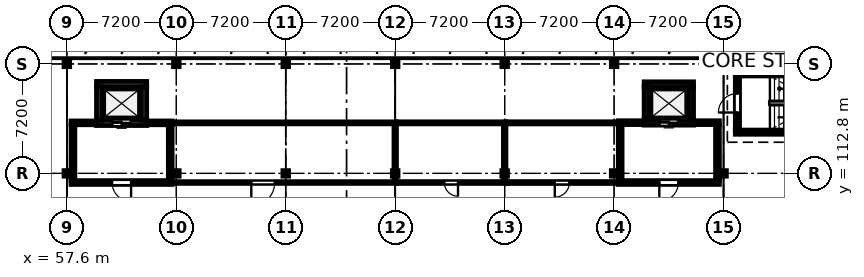
"""IFC4 building model, lengths in metres.
Left out: names, types, materials, properties, quantities, classifications, styles, units other than length and angle.
Written with IfcOpenShell. Run it as: python <this file> out.ifc"""

import sys

from ifc_helpers import new_model, si_unit, direction, frame, frame_2d, origin, origin_2d, place, context, subcontext, project, spatial, rectangle, i_section, extrude, element, fill, save


model = new_model("IFC4")
c1 = context("Model", 3, precision=1e-05, world=origin(), true_north=direction((0.0, 1.0)))
c2 = subcontext(c1, "Body", "Model", "MODEL_VIEW")
j1 = project(units=[si_unit("LENGTHUNIT", "METRE"), si_unit("PLANEANGLEUNIT", "RADIAN")], contexts=[c1])
p1 = place(None, origin())
s1 = spatial("IfcSite", under=j1, at=p1, CompositionType="ELEMENT")
p2 = place(p1, origin())
s2 = spatial("IfcBuilding", under=s1, at=p2, CompositionType="ELEMENT")
p3 = place(p2, frame((0.0, 0.0, 17.1)))
s3 = spatial("IfcBuildingStorey", under=s2, at=p3, CompositionType="ELEMENT", Elevation=17.1)
p4 = place(p3, frame((57.6, 112.8, 0.0), z_axis=(0.0, 0.0, 1.0), x_axis=(1.0, 0.0, 0.0)))
e1 = element("IfcColumn", 1, at=p4, inside=s3, PredefinedType="COLUMN", context=c2, shape_type="SweptSolid", body=[
    extrude(i_section(OverallWidth=0.371, OverallDepth=0.363, WebThickness=0.013, FlangeThickness=0.022, FilletRadius=0.015, at=origin_2d()), origin(), (0.0, 0.0, 1.0), 3.9),
])
p5 = place(p3, frame((57.6, 120.0, 0.0), z_axis=(0.0, 0.0, 1.0), x_axis=(1.0, 0.0, 0.0)))
e2 = element("IfcColumn", 2, at=p5, inside=s3, PredefinedType="COLUMN", context=c2, shape_type="SweptSolid", body=[
    extrude(i_section(OverallWidth=0.368, OverallDepth=0.356, WebThickness=0.011, FlangeThickness=0.018, FilletRadius=0.015, at=origin_2d()), origin(), (0.0, 0.0, 1.0), 3.9),
])
p6 = place(p3, frame((64.8, 112.8, 0.0), z_axis=(0.0, 0.0, 1.0), x_axis=(1.0, 0.0, 0.0)))
e3 = element("IfcColumn", 3, at=p6, inside=s3, PredefinedType="COLUMN", context=c2, shape_type="SweptSolid", body=[
    extrude(i_section(OverallWidth=0.371, OverallDepth=0.363, WebThickness=0.013, FlangeThickness=0.022, FilletRadius=0.015, at=origin_2d()), origin(), (0.0, 0.0, 1.0), 3.9),
])
p7 = place(p3, frame((64.8, 120.0, 0.0), z_axis=(0.0, 0.0, 1.0), x_axis=(1.0, 0.0, 0.0)))
e4 = element("IfcColumn", 4, at=p7, inside=s3, PredefinedType="COLUMN", context=c2, shape_type="SweptSolid", body=[
    extrude(i_section(OverallWidth=0.368, OverallDepth=0.356, WebThickness=0.011, FlangeThickness=0.018, FilletRadius=0.015, at=origin_2d()), origin(), (0.0, 0.0, 1.0), 3.9),
])
p8 = place(p3, frame((72.0, 112.8, 0.0), z_axis=(0.0, 0.0, 1.0), x_axis=(1.0, 0.0, 0.0)))
e5 = element("IfcColumn", 5, at=p8, inside=s3, PredefinedType="COLUMN", context=c2, shape_type="SweptSolid", body=[
    extrude(i_section(OverallWidth=0.371, OverallDepth=0.363, WebThickness=0.013, FlangeThickness=0.022, FilletRadius=0.015, at=origin_2d()), origin(), (0.0, 0.0, 1.0), 3.9),
])
p9 = place(p3, frame((72.0, 120.0, 0.0), z_axis=(0.0, 0.0, 1.0), x_axis=(1.0, 0.0, 0.0)))
e6 = element("IfcColumn", 6, at=p9, inside=s3, PredefinedType="COLUMN", context=c2, shape_type="SweptSolid", body=[
    extrude(i_section(OverallWidth=0.368, OverallDepth=0.356, WebThickness=0.011, FlangeThickness=0.018, FilletRadius=0.015, at=origin_2d()), origin(), (0.0, 0.0, 1.0), 3.9),
])
p10 = place(p3, frame((79.2, 112.8, 0.0), z_axis=(0.0, 0.0, 1.0), x_axis=(1.0, 0.0, 0.0)))
e7 = element("IfcColumn", 7, at=p10, inside=s3, PredefinedType="COLUMN", context=c2, shape_type="SweptSolid", body=[
    extrude(i_section(OverallWidth=0.371, OverallDepth=0.363, WebThickness=0.013, FlangeThickness=0.022, FilletRadius=0.015, at=origin_2d()), origin(), (0.0, 0.0, 1.0), 3.9),
])
p11 = place(p3, frame((79.2, 120.0, 0.0), z_axis=(0.0, 0.0, 1.0), x_axis=(1.0, 0.0, 0.0)))
e8 = element("IfcColumn", 8, at=p11, inside=s3, PredefinedType="COLUMN", context=c2, shape_type="SweptSolid", body=[
    extrude(i_section(OverallWidth=0.368, OverallDepth=0.356, WebThickness=0.011, FlangeThickness=0.018, FilletRadius=0.015, at=origin_2d()), origin(), (0.0, 0.0, 1.0), 3.9),
])
p12 = place(p3, frame((86.4, 112.8, 0.0), z_axis=(0.0, 0.0, 1.0), x_axis=(1.0, 0.0, 0.0)))
e9 = element("IfcColumn", 9, at=p12, inside=s3, PredefinedType="COLUMN", context=c2, shape_type="SweptSolid", body=[
    extrude(i_section(OverallWidth=0.371, OverallDepth=0.363, WebThickness=0.013, FlangeThickness=0.022, FilletRadius=0.015, at=origin_2d()), origin(), (0.0, 0.0, 1.0), 3.9),
])
p13 = place(p3, frame((86.4, 120.0, 0.0), z_axis=(0.0, 0.0, 1.0), x_axis=(1.0, 0.0, 0.0)))
e10 = element("IfcColumn", 10, at=p13, inside=s3, PredefinedType="COLUMN", context=c2, shape_type="SweptSolid", body=[
    extrude(i_section(OverallWidth=0.368, OverallDepth=0.356, WebThickness=0.011, FlangeThickness=0.018, FilletRadius=0.015, at=origin_2d()), origin(), (0.0, 0.0, 1.0), 3.9),
])
p14 = place(p3, frame((93.6, 112.8, 0.0), z_axis=(0.0, 0.0, 1.0), x_axis=(1.0, 0.0, 0.0)))
e11 = element("IfcColumn", 11, at=p14, inside=s3, PredefinedType="COLUMN", context=c2, shape_type="SweptSolid", body=[
    extrude(i_section(OverallWidth=0.371, OverallDepth=0.363, WebThickness=0.013, FlangeThickness=0.022, FilletRadius=0.015, at=origin_2d()), origin(), (0.0, 0.0, 1.0), 3.9),
])
p15 = place(p3, frame((93.6, 120.0, 0.0), z_axis=(0.0, 0.0, 1.0), x_axis=(1.0, 0.0, 0.0)))
e12 = element("IfcColumn", 12, at=p15, inside=s3, PredefinedType="COLUMN", context=c2, shape_type="SweptSolid", body=[
    extrude(i_section(OverallWidth=0.368, OverallDepth=0.356, WebThickness=0.011, FlangeThickness=0.018, FilletRadius=0.015, at=origin_2d()), origin(), (0.0, 0.0, 1.0), 3.9),
])
p16 = place(p3, frame((100.8, 112.8, 0.0), z_axis=(0.0, 0.0, 1.0), x_axis=(1.0, 0.0, 0.0)))
e13 = element("IfcColumn", 13, at=p16, inside=s3, PredefinedType="COLUMN", context=c2, shape_type="SweptSolid", body=[
    extrude(i_section(OverallWidth=0.371, OverallDepth=0.363, WebThickness=0.013, FlangeThickness=0.022, FilletRadius=0.015, at=origin_2d()), origin(), (0.0, 0.0, 1.0), 3.9),
])
p17 = place(p3, frame((100.8, 120.0, 0.0), z_axis=(0.0, 0.0, 1.0), x_axis=(1.0, 0.0, 0.0)))
e14 = element("IfcColumn", 14, at=p17, inside=s3, PredefinedType="COLUMN", context=c2, shape_type="SweptSolid", body=[
    extrude(i_section(OverallWidth=0.368, OverallDepth=0.356, WebThickness=0.011, FlangeThickness=0.018, FilletRadius=0.015, at=origin_2d()), origin(), (0.0, 0.0, 1.0), 3.9),
])
for number, where, z_axis, x_axis in (
    (15, (110.475, 115.512, 0.0), (0.0, 0.0, 1.0), (-1.0, 0.0, 0.0)),
    (16, (101.575, 119.348, 0.0), (0.0, 0.0, 1.0), (1.0, 0.0, 0.0)),
):
    element("IfcWall", number, at=place(p3, frame(where, z_axis=z_axis, x_axis=x_axis)), inside=s3, PredefinedType="SOLIDWALL", context=c2, shape_type="SweptSolid", body=[
        extrude(rectangle(XDim=8.9, YDim=0.275, at=frame_2d((4.45, 0.0))), origin(), (0.0, 0.0, 1.0), 3.64),
    ])
p18 = place(p3, frame((101.712, 115.65, 0.0), z_axis=(0.0, 0.0, 1.0), x_axis=(0.0, 1.0, 0.0)))
e17 = element("IfcWall", 17, at=p18, inside=s3, PredefinedType="SOLIDWALL", context=c2, shape_type="SweptSolid", body=[
    extrude(rectangle(XDim=3.56, YDim=0.275, at=frame_2d((1.78, 0.0))), origin(), (0.0, 0.0, 1.0), 3.64),
])
p19 = place(p18, frame((1.155, 0.0, 0.0)))
e18 = element("IfcOpeningElement", 18, at=p19, cuts=e17, PredefinedType="OPENING", context=c2, shape_type="SweptSolid", body=[
    extrude(rectangle(XDim=1.25, YDim=2.2, at=frame_2d((0.625, 1.1))), frame((0.0, 0.147, 0.0), z_axis=(0.0, -1.0, 0.0), x_axis=(1.0, 0.0, 0.0)), (0.0, 0.0, 1.0), 0.295),
])
p20 = place(p3, frame((62.85, 116.125, 0.0), z_axis=(0.0, 0.0, 1.0), x_axis=(-1.0, 0.0, 0.0)))
e19 = element("IfcWall", 19, at=p20, inside=s3, PredefinedType="SHEAR", context=c2, shape_type="SweptSolid", body=[
    extrude(rectangle(XDim=3.3, YDim=0.35, at=frame_2d((1.65, 0.0))), origin(), (0.0, 0.0, 1.0), 3.64),
])
p21 = place(p20, frame((1.05, 0.0, 0.0)))
e20 = element("IfcOpeningElement", 20, at=p21, cuts=e19, PredefinedType="OPENING", context=c2, shape_type="SweptSolid", body=[
    extrude(rectangle(XDim=1.2, YDim=2.2, at=frame_2d((0.6, 1.1))), frame((0.0, 0.185, 0.0), z_axis=(0.0, -1.0, 0.0), x_axis=(1.0, 0.0, 0.0)), (0.0, 0.0, 1.0), 0.37),
])
p22 = place(p3, frame((59.55, 118.675, 0.0), z_axis=(0.0, 0.0, 1.0), x_axis=(1.0, 0.0, 0.0)))
e21 = element("IfcWall", 21, at=p22, inside=s3, PredefinedType="SHEAR", context=c2, shape_type="SweptSolid", body=[
    extrude(rectangle(XDim=3.3, YDim=0.35, at=frame_2d((1.65, 0.0))), origin(), (0.0, 0.0, 1.0), 3.64),
])
for number, where, z_axis, x_axis in (
    (22, (59.725, 116.3, 0.0), (0.0, 0.0, 1.0), (0.0, 1.0, 0.0)),
    (23, (62.675, 118.5, 0.0), (0.0, 0.0, 1.0), (0.0, -1.0, 0.0)),
):
    element("IfcWall", number, at=place(p3, frame(where, z_axis=z_axis, x_axis=x_axis)), inside=s3, PredefinedType="SHEAR", context=c2, shape_type="SweptSolid", body=[
        extrude(rectangle(XDim=2.2, YDim=0.35, at=frame_2d((1.1, 0.0))), origin(), (0.0, 0.0, 1.0), 3.64),
    ])
p23 = place(p3, frame((98.825, 116.138, 0.0), z_axis=(0.0, 0.0, 1.0), x_axis=(-1.0, 0.0, 0.0)))
e24 = element("IfcWall", 24, at=p23, inside=s3, PredefinedType="SHEAR", context=c2, shape_type="SweptSolid", body=[
    extrude(rectangle(XDim=3.25, YDim=0.325, at=frame_2d((1.625, 0.0))), origin(), (0.0, 0.0, 1.0), 3.64),
])
p24 = place(p23, frame((1.025, 0.0, 0.0)))
e25 = element("IfcOpeningElement", 25, at=p24, cuts=e24, PredefinedType="OPENING", context=c2, shape_type="SweptSolid", body=[
    extrude(rectangle(XDim=1.2, YDim=2.2, at=frame_2d((0.6, 1.1))), frame((0.0, 0.172, 0.0), z_axis=(0.0, -1.0, 0.0), x_axis=(1.0, 0.0, 0.0)), (0.0, 0.0, 1.0), 0.345),
])
p25 = place(p3, frame((95.575, 118.662, 0.0), z_axis=(0.0, 0.0, 1.0), x_axis=(1.0, 0.0, 0.0)))
e26 = element("IfcWall", 26, at=p25, inside=s3, PredefinedType="SHEAR", context=c2, shape_type="SweptSolid", body=[
    extrude(rectangle(XDim=3.25, YDim=0.325, at=frame_2d((1.625, 0.0))), origin(), (0.0, 0.0, 1.0), 3.64),
])
for number, where, z_axis, x_axis in (
    (27, (95.738, 116.3, 0.0), (0.0, 0.0, 1.0), (0.0, 1.0, 0.0)),
    (28, (98.662, 118.5, 0.0), (0.0, 0.0, 1.0), (0.0, -1.0, 0.0)),
):
    element("IfcWall", number, at=place(p3, frame(where, z_axis=z_axis, x_axis=x_axis)), inside=s3, PredefinedType="SHEAR", context=c2, shape_type="SweptSolid", body=[
        extrude(rectangle(XDim=2.2, YDim=0.325, at=frame_2d((1.1, 0.0))), origin(), (0.0, 0.0, 1.0), 3.64),
    ])
p26 = place(p3, frame((64.525, 112.2, 0.0), z_axis=(0.0, 0.0, 1.0), x_axis=(-1.0, 0.0, 0.0)))
e29 = element("IfcWall", 29, at=p26, inside=s3, PredefinedType="PARTITIONING", context=c2, shape_type="SweptSolid", body=[
    extrude(rectangle(XDim=6.65, YDim=0.25, at=frame_2d((3.325, 0.0))), origin(), (0.0, 0.0, 1.0), 2.863),
])
p27 = place(p26, frame((2.7, 0.0, 0.0)))
e30 = element("IfcOpeningElement", 30, at=p27, cuts=e29, PredefinedType="OPENING", context=c2, shape_type="SweptSolid", body=[
    extrude(rectangle(XDim=1.25, YDim=2.2, at=frame_2d((0.625, 1.1))), frame((0.0, 0.135, 0.0), z_axis=(0.0, -1.0, 0.0), x_axis=(1.0, 0.0, 0.0)), (0.0, 0.0, 1.0), 0.27),
])
p28 = place(p3, frame((57.875, 116.125, 0.0), z_axis=(0.0, 0.0, 1.0), x_axis=(1.0, 0.0, 0.0)))
e31 = element("IfcWall", 31, at=p28, inside=s3, PredefinedType="PARTITIONING", context=c2, shape_type="SweptSolid", body=[
    extrude(rectangle(XDim=1.673, YDim=0.25, at=frame_2d((0.836, 0.0))), origin(), (0.0, 0.0, 1.0), 2.863),
])
p29 = place(p3, frame((62.852, 116.125, 0.0), z_axis=(0.0, 0.0, 1.0), x_axis=(1.0, 0.0, 0.0)))
e32 = element("IfcWall", 32, at=p29, inside=s3, PredefinedType="PARTITIONING", context=c2, shape_type="SweptSolid", body=[
    extrude(rectangle(XDim=1.673, YDim=0.25, at=frame_2d((0.836, 0.0))), origin(), (0.0, 0.0, 1.0), 2.863),
])
for number, where, z_axis, x_axis in (
    (33, (58.0, 112.327, 0.0), (0.0, 0.0, 1.0), (0.0, 1.0, 0.0)),
    (34, (64.4, 115.998, 0.0), (0.0, 0.0, 1.0), (0.0, -1.0, 0.0)),
):
    element("IfcWall", number, at=place(p3, frame(where, z_axis=z_axis, x_axis=x_axis)), inside=s3, PredefinedType="PARTITIONING", context=c2, shape_type="SweptSolid", body=[
        extrude(rectangle(XDim=3.671, YDim=0.25, at=frame_2d((1.835, 0.0))), origin(), (0.0, 0.0, 1.0), 2.863),
    ])
p30 = place(p3, frame((100.525, 112.2, 0.0), z_axis=(0.0, 0.0, 1.0), x_axis=(-1.0, 0.0, 0.0)))
e35 = element("IfcWall", 35, at=p30, inside=s3, PredefinedType="PARTITIONING", context=c2, shape_type="SweptSolid", body=[
    extrude(rectangle(XDim=6.65, YDim=0.25, at=frame_2d((3.325, 0.0))), origin(), (0.0, 0.0, 1.0), 2.863),
])
p31 = place(p30, frame((2.7, 0.0, 0.0)))
e36 = element("IfcOpeningElement", 36, at=p31, cuts=e35, PredefinedType="OPENING", context=c2, shape_type="SweptSolid", body=[
    extrude(rectangle(XDim=1.25, YDim=2.2, at=frame_2d((0.625, 1.1))), frame((0.0, 0.135, 0.0), z_axis=(0.0, -1.0, 0.0), x_axis=(1.0, 0.0, 0.0)), (0.0, 0.0, 1.0), 0.27),
])
for number, where, z_axis, x_axis in (
    (37, (93.875, 116.138, 0.0), (0.0, 0.0, 1.0), (1.0, 0.0, 0.0)),
    (38, (98.827, 116.138, 0.0), (0.0, 0.0, 1.0), (1.0, 0.0, 0.0)),
):
    element("IfcWall", number, at=place(p3, frame(where, z_axis=z_axis, x_axis=x_axis)), inside=s3, PredefinedType="PARTITIONING", context=c2, shape_type="SweptSolid", body=[
        extrude(rectangle(XDim=1.698, YDim=0.25, at=frame_2d((0.849, 0.0))), origin(), (0.0, 0.0, 1.0), 2.863),
    ])
for number, where, z_axis, x_axis in (
    (39, (94.0, 112.327, 0.0), (0.0, 0.0, 1.0), (0.0, 1.0, 0.0)),
    (40, (100.4, 116.011, 0.0), (0.0, 0.0, 1.0), (0.0, -1.0, 0.0)),
):
    element("IfcWall", number, at=place(p3, frame(where, z_axis=z_axis, x_axis=x_axis)), inside=s3, PredefinedType="PARTITIONING", context=c2, shape_type="SweptSolid", body=[
        extrude(rectangle(XDim=3.684, YDim=0.25, at=frame_2d((1.842, 0.0))), origin(), (0.0, 0.0, 1.0), 2.863),
    ])
p32 = place(p3, frame((79.28, 112.2, 0.0), z_axis=(0.0, 0.0, 1.0), x_axis=(-1.0, 0.0, 0.0)))
e41 = element("IfcWall", 41, at=p32, inside=s3, PredefinedType="PARTITIONING", context=c2, shape_type="SweptSolid", body=[
    extrude(rectangle(XDim=14.753, YDim=0.115, at=frame_2d((7.376, 0.0))), origin(), (0.0, 0.0, 1.0), 2.863),
])
p33 = place(p32, frame((8.007, 0.0, 0.0)))
e42 = element("IfcOpeningElement", 42, at=p33, cuts=e41, PredefinedType="OPENING", context=c2, shape_type="SweptSolid", body=[
    extrude(rectangle(XDim=1.54, YDim=2.1, at=frame_2d((0.77, 1.05))), frame((0.0, 0.067, 0.0), z_axis=(0.0, -1.0, 0.0), x_axis=(1.0, 0.0, 0.0)), (0.0, 0.0, 1.0), 0.135),
])
p34 = place(p3, frame((86.48, 112.2, 0.0), z_axis=(0.0, 0.0, 1.0), x_axis=(-1.0, 0.0, 0.0)))
e43 = element("IfcWall", 43, at=p34, inside=s3, PredefinedType="PARTITIONING", context=c2, shape_type="SweptSolid", body=[
    extrude(rectangle(XDim=7.198, YDim=0.12, at=frame_2d((3.599, 0.0))), origin(), (0.0, 0.0, 1.0), 2.863),
])
p35 = place(p34, frame((3.149, 0.0, 0.0)))
e44 = element("IfcOpeningElement", 44, at=p35, cuts=e43, PredefinedType="OPENING", context=c2, shape_type="SweptSolid", body=[
    extrude(rectangle(XDim=0.9, YDim=2.16, at=frame_2d((0.45, 1.08))), frame((0.0, 0.07, 0.0), z_axis=(0.0, -1.0, 0.0), x_axis=(1.0, 0.0, 0.0)), (0.0, 0.0, 1.0), 0.14),
])
p36 = place(p3, frame((93.873, 112.2, 0.0), z_axis=(0.0, 0.0, 1.0), x_axis=(-1.0, 0.0, 0.0)))
e45 = element("IfcWall", 45, at=p36, inside=s3, PredefinedType="PARTITIONING", context=c2, shape_type="SweptSolid", body=[
    extrude(rectangle(XDim=7.391, YDim=0.125, at=frame_2d((3.696, 0.0))), origin(), (0.0, 0.0, 1.0), 2.863),
])
p37 = place(p36, frame((3.216, 0.0, 0.0)))
e46 = element("IfcOpeningElement", 46, at=p37, cuts=e45, PredefinedType="OPENING", context=c2, shape_type="SweptSolid", body=[
    extrude(rectangle(XDim=0.96, YDim=2.16, at=frame_2d((0.48, 1.08))), frame((0.0, 0.073, 0.0), z_axis=(0.0, -1.0, 0.0), x_axis=(1.0, 0.0, 0.0)), (0.0, 0.0, 1.0), 0.145),
])
p38 = place(p3, frame((64.527, 116.125, 0.0), z_axis=(0.0, 0.0, 1.0), x_axis=(1.0, 0.0, 0.0)))
e47 = element("IfcWall", 47, at=p38, inside=s3, PredefinedType="PARTITIONING", context=c2, shape_type="SweptSolid", body=[
    extrude(rectangle(XDim=14.753, YDim=0.13, at=frame_2d((7.376, 0.0))), origin(), (0.0, 0.0, 1.0), 2.863),
])
p39 = place(p3, frame((79.282, 116.125, 0.0), z_axis=(0.0, 0.0, 1.0), x_axis=(1.0, 0.0, 0.0)))
e48 = element("IfcWall", 48, at=p39, inside=s3, PredefinedType="PARTITIONING", context=c2, shape_type="SweptSolid", body=[
    extrude(rectangle(XDim=7.198, YDim=0.135, at=frame_2d((3.599, 0.0))), origin(), (0.0, 0.0, 1.0), 2.863),
])
p40 = place(p3, frame((86.482, 116.125, 0.0), z_axis=(0.0, 0.0, 1.0), x_axis=(1.0, 0.0, 0.0)))
e49 = element("IfcWall", 49, at=p40, inside=s3, PredefinedType="PARTITIONING", context=c2, shape_type="SweptSolid", body=[
    extrude(rectangle(XDim=7.391, YDim=0.14, at=frame_2d((3.696, 0.0))), origin(), (0.0, 0.0, 1.0), 2.863),
])
p41 = place(p3, frame((79.2, 116.056, 0.0), z_axis=(0.0, 0.0, 1.0), x_axis=(0.0, -1.0, 0.0)))
e50 = element("IfcWall", 50, at=p41, inside=s3, PredefinedType="PARTITIONING", context=c2, shape_type="SweptSolid", body=[
    extrude(rectangle(XDim=3.794, YDim=0.16, at=frame_2d((1.897, 0.0))), origin(), (0.0, 0.0, 1.0), 2.863),
])
p42 = place(p3, frame((86.4, 116.053, 0.0), z_axis=(0.0, 0.0, 1.0), x_axis=(0.0, -1.0, 0.0)))
e51 = element("IfcWall", 51, at=p42, inside=s3, PredefinedType="PARTITIONING", context=c2, shape_type="SweptSolid", body=[
    extrude(rectangle(XDim=3.789, YDim=0.165, at=frame_2d((1.895, 0.0))), origin(), (0.0, 0.0, 1.0), 2.863),
])
p43 = place(p19, origin())
e52 = element("IfcDoor", 52, at=p43, inside=s3, OperationType="SINGLE_SWING_LEFT", PredefinedType="DOOR", context=c2, shape_type="SweptSolid", body=[
    extrude(rectangle(XDim=1.25, YDim=2.2, at=frame_2d((0.625, 1.1))), frame((0.0, 0.025, 0.0), z_axis=(0.0, -1.0, 0.0), x_axis=(1.0, 0.0, 0.0)), (0.0, 0.0, 1.0), 0.05),
])
fill(e18, e52)
p44 = place(p21, origin())
e53 = element("IfcDoor", 53, at=p44, inside=s3, OperationType="DOUBLE_DOOR_SLIDING", PredefinedType="DOOR", context=c2, shape_type="SweptSolid", body=[
    extrude(rectangle(XDim=1.2, YDim=2.2, at=frame_2d((0.6, 1.1))), frame((0.0, 0.025, 0.0), z_axis=(0.0, -1.0, 0.0), x_axis=(1.0, 0.0, 0.0)), (0.0, 0.0, 1.0), 0.05),
])
fill(e20, e53)
p45 = place(p24, origin())
e54 = element("IfcDoor", 54, at=p45, inside=s3, OperationType="DOUBLE_DOOR_SLIDING", PredefinedType="DOOR", context=c2, shape_type="SweptSolid", body=[
    extrude(rectangle(XDim=1.2, YDim=2.2, at=frame_2d((0.6, 1.1))), frame((0.0, 0.025, 0.0), z_axis=(0.0, -1.0, 0.0), x_axis=(1.0, 0.0, 0.0)), (0.0, 0.0, 1.0), 0.05),
])
fill(e25, e54)
p46 = place(p27, origin())
e55 = element("IfcDoor", 55, at=p46, inside=s3, OperationType="SINGLE_SWING_LEFT", PredefinedType="DOOR", context=c2, shape_type="SweptSolid", body=[
    extrude(rectangle(XDim=1.25, YDim=2.2, at=frame_2d((0.625, 1.1))), frame((0.0, 0.025, 0.0), z_axis=(0.0, -1.0, 0.0), x_axis=(1.0, 0.0, 0.0)), (0.0, 0.0, 1.0), 0.05),
])
fill(e30, e55)
p47 = place(p31, origin())
e56 = element("IfcDoor", 56, at=p47, inside=s3, OperationType="SINGLE_SWING_RIGHT", PredefinedType="DOOR", context=c2, shape_type="SweptSolid", body=[
    extrude(rectangle(XDim=1.25, YDim=2.2, at=frame_2d((0.625, 1.1))), frame((0.0, 0.025, 0.0), z_axis=(0.0, -1.0, 0.0), x_axis=(1.0, 0.0, 0.0)), (0.0, 0.0, 1.0), 0.05),
])
fill(e36, e56)
p48 = place(p33, origin())
e57 = element("IfcDoor", 57, at=p48, inside=s3, OperationType="SINGLE_SWING_RIGHT", PredefinedType="DOOR", context=c2, shape_type="SweptSolid", body=[
    extrude(rectangle(XDim=1.54, YDim=2.1, at=frame_2d((0.77, 1.05))), frame((0.0, 0.025, 0.0), z_axis=(0.0, -1.0, 0.0), x_axis=(1.0, 0.0, 0.0)), (0.0, 0.0, 1.0), 0.05),
])
fill(e42, e57)
p49 = place(p35, origin())
e58 = element("IfcDoor", 58, at=p49, inside=s3, OperationType="SINGLE_SWING_LEFT", PredefinedType="DOOR", context=c2, shape_type="SweptSolid", body=[
    extrude(rectangle(XDim=0.9, YDim=2.16, at=frame_2d((0.45, 1.08))), frame((0.0, 0.025, 0.0), z_axis=(0.0, -1.0, 0.0), x_axis=(1.0, 0.0, 0.0)), (0.0, 0.0, 1.0), 0.05),
])
fill(e44, e58)
p50 = place(p37, origin())
e59 = element("IfcDoor", 59, at=p50, inside=s3, OperationType="SINGLE_SWING_RIGHT", PredefinedType="DOOR", context=c2, shape_type="SweptSolid", body=[
    extrude(rectangle(XDim=0.96, YDim=2.16, at=frame_2d((0.48, 1.08))), frame((0.0, 0.025, 0.0), z_axis=(0.0, -1.0, 0.0), x_axis=(1.0, 0.0, 0.0)), (0.0, 0.0, 1.0), 0.05),
])
fill(e46, e59)
save(model, sys.argv[1])
